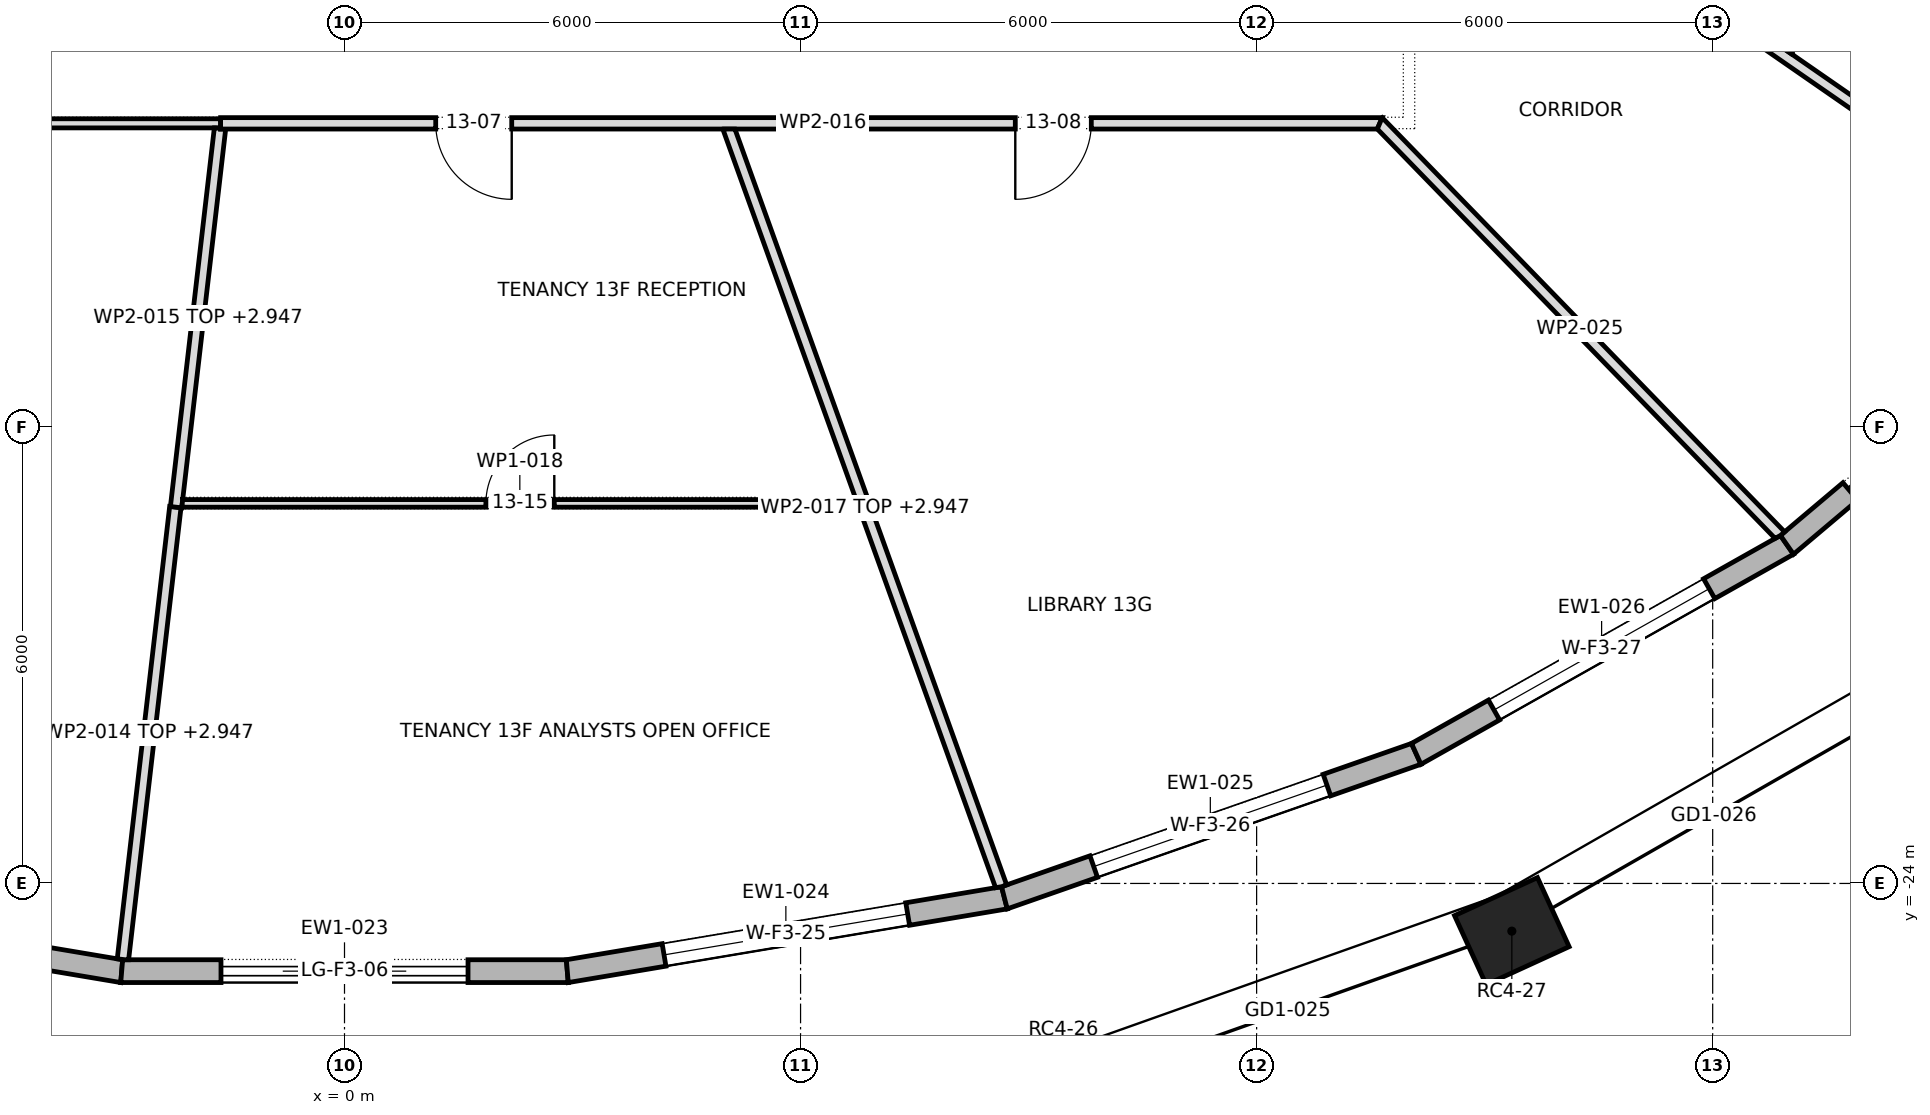
"""IFC4 building model, lengths in metres.
Left out: names, types, materials, properties, quantities, classifications, styles, units other than length and angle.
Written with IfcOpenShell. Run it as: python <this file> out.ifc"""

import sys

from ifc_helpers import new_model, si_unit, direction, frame, frame_2d, origin, origin_2d, place, context, subcontext, project, spatial, polyline, rectangle, outline, extrude, element, fill, save


model = new_model("IFC4")
c1 = context("Model", 3, precision=1e-05, world=origin(), true_north=direction((0.0, 1.0)))
c2 = subcontext(c1, "Body", "Model", "MODEL_VIEW")
j1 = project(units=[si_unit("LENGTHUNIT", "METRE"), si_unit("PLANEANGLEUNIT", "RADIAN")], contexts=[c1])
p1 = place(None, origin())
s1 = spatial("IfcSite", under=j1, at=p1, CompositionType="ELEMENT")
p2 = place(p1, origin())
s2 = spatial("IfcBuilding", under=s1, at=p2, CompositionType="ELEMENT")
p3 = place(p2, frame((0.0, 0.0, 190.9)))
s3 = spatial("IfcBuildingStorey", under=s2, at=p3, CompositionType="ELEMENT", Elevation=190.9)
p4 = place(p3, frame((15.358, -24.627, 0.0), z_axis=(0.0, 0.0, 1.0), x_axis=(0.909125641902, 0.416521988898, 0.0)))
e1 = element("IfcColumn", 1, at=p4, inside=s3, PredefinedType="COLUMN", context=c2, shape_type="SweptSolid", body=[
    extrude(rectangle(XDim=1.2, YDim=1.0, at=origin_2d()), origin(), (0.0, 0.0, 1.0), 4.0),
])
p5 = place(p3, frame((-8.682, -24.189, 0.0), z_axis=(0.0, 0.0, 1.0), x_axis=(0.986207709048, -0.165512400181, 0.0)))
e2 = element("IfcWall", 2, at=p5, inside=s3, PredefinedType="STANDARD", context=c2, shape_type="SweptSolid", body=[
    extrude(outline(polyline([(-0.013, -0.15), (5.843, -0.15), (5.818, 0.15), (0.013, 0.15), (-0.013, -0.15)])), origin(), (0.0, 0.0, 1.0), 3.7),
])
p6 = place(p5, frame((1.291, 0.0, 0.6)))
e3 = element("IfcOpeningElement", 3, at=p6, cuts=e2, PredefinedType="OPENING", context=c2, shape_type="SweptSolid", body=[
    extrude(rectangle(XDim=3.25, YDim=2.65, at=frame_2d((1.625, 1.325))), frame((0.0, 0.162, 0.0), z_axis=(0.0, -1.0, 0.0), x_axis=(1.0, 0.0, 0.0)), (0.0, 0.0, 1.0), 0.324),
])
p7 = place(p3, frame((-2.931, -25.154, 0.0), z_axis=(0.0, 0.0, 1.0), x_axis=(1.0, 0.0, 0.0)))
e4 = element("IfcWall", 4, at=p7, inside=s3, PredefinedType="STANDARD", context=c2, shape_type="SweptSolid", body=[
    extrude(outline(polyline([(-0.012, -0.15), (5.875, -0.15), (5.85, 0.15), (0.012, 0.15), (-0.012, -0.15)])), origin(), (0.0, 0.0, 1.0), 3.7),
])
p8 = place(p7, frame((1.306, 0.0, 0.0)))
e5 = element("IfcOpeningElement", 5, at=p8, cuts=e4, PredefinedType="OPENING", context=c2, shape_type="SweptSolid", body=[
    extrude(rectangle(XDim=3.25, YDim=3.25, at=frame_2d((1.625, 1.625))), frame((0.0, 0.162, 0.0), z_axis=(0.0, -1.0, 0.0), x_axis=(1.0, 0.0, 0.0)), (0.0, 0.0, 1.0), 0.324),
])
p9 = place(p3, frame((2.931, -25.154, 0.0), z_axis=(0.0, 0.0, 1.0), x_axis=(0.986207709048, 0.165512400181, 0.0)))
e6 = element("IfcWall", 6, at=p9, inside=s3, PredefinedType="STANDARD", context=c2, shape_type="SweptSolid", body=[
    extrude(outline(polyline([(-0.012, -0.15), (5.844, -0.15), (5.818, 0.15), (0.012, 0.15), (-0.012, -0.15)])), origin(), (0.0, 0.0, 1.0), 3.7),
])
p10 = place(p9, frame((1.291, 0.0, 0.6)))
e7 = element("IfcOpeningElement", 7, at=p10, cuts=e6, PredefinedType="OPENING", context=c2, shape_type="SweptSolid", body=[
    extrude(rectangle(XDim=3.25, YDim=2.65, at=frame_2d((1.625, 1.325))), frame((0.0, 0.162, 0.0), z_axis=(0.0, -1.0, 0.0), x_axis=(1.0, 0.0, 0.0)), (0.0, 0.0, 1.0), 0.324),
])
p11 = place(p3, frame((8.682, -24.189, 0.0), z_axis=(0.0, 0.0, 1.0), x_axis=(0.944020060936, 0.329888048511, 0.0)))
e8 = element("IfcWall", 8, at=p11, inside=s3, PredefinedType="STANDARD", context=c2, shape_type="SweptSolid", body=[
    extrude(outline(polyline([(-0.013, -0.15), (5.753, -0.15), (5.726, 0.15), (0.013, 0.15), (-0.013, -0.15)])), origin(), (0.0, 0.0, 1.0), 3.7),
])
p12 = place(p11, frame((1.245, 0.0, 0.6)))
e9 = element("IfcOpeningElement", 9, at=p12, cuts=e8, PredefinedType="OPENING", context=c2, shape_type="SweptSolid", body=[
    extrude(rectangle(XDim=3.25, YDim=2.65, at=frame_2d((1.625, 1.325))), frame((0.0, 0.162, 0.0), z_axis=(0.0, -1.0, 0.0), x_axis=(1.0, 0.0, 0.0)), (0.0, 0.0, 1.0), 0.324),
])
p13 = place(p3, frame((14.1, -22.295, 0.0), z_axis=(0.0, 0.0, 1.0), x_axis=(0.871083701819, 0.491134588912, 0.0)))
e10 = element("IfcWall", 10, at=p13, inside=s3, PredefinedType="STANDARD", context=c2, shape_type="SweptSolid", body=[
    extrude(outline(polyline([(-0.013, -0.15), (5.614, -0.15), (5.585, 0.15), (0.013, 0.15), (-0.013, -0.15)])), origin(), (0.0, 0.0, 1.0), 3.7),
])
p14 = place(p13, frame((1.175, 0.0, 0.6)))
e11 = element("IfcOpeningElement", 11, at=p14, cuts=e10, PredefinedType="OPENING", context=c2, shape_type="SweptSolid", body=[
    extrude(rectangle(XDim=3.25, YDim=2.65, at=frame_2d((1.625, 1.325))), frame((0.0, 0.162, 0.0), z_axis=(0.0, -1.0, 0.0), x_axis=(1.0, 0.0, 0.0)), (0.0, 0.0, 1.0), 0.324),
])
p15 = place(p3, frame((18.977, -19.545, 0.0), z_axis=(0.0, 0.0, 1.0), x_axis=(0.764330261608, 0.644824977176, 0.0)))
e12 = element("IfcWall", 12, at=p15, inside=s3, PredefinedType="STANDARD", context=c2, shape_type="SweptSolid", body=[
    extrude(outline(polyline([(-0.014, -0.15), (5.445, -0.15), (5.415, 0.15), (0.014, 0.15), (-0.014, -0.15)])), origin(), (0.0, 0.0, 1.0), 3.7),
])
p16 = place(p15, frame((1.09, 0.0, 0.0)))
e13 = element("IfcOpeningElement", 13, at=p16, cuts=e12, PredefinedType="OPENING", context=c2, shape_type="SweptSolid", body=[
    extrude(rectangle(XDim=3.25, YDim=3.25, at=frame_2d((1.625, 1.625))), frame((0.0, 0.162, 0.0), z_axis=(0.0, -1.0, 0.0), x_axis=(1.0, 0.0, 0.0)), (0.0, 0.0, 1.0), 0.324),
])
p17 = place(p3, frame((-13.646, -14.0, 0.0), z_axis=(0.0, 0.0, 1.0), x_axis=(1.0, 0.0, 0.0)))
e14 = element("IfcWall", 14, at=p17, inside=s3, PredefinedType="PARTITIONING", context=c2, shape_type="SweptSolid", body=[
    extrude(outline(polyline([(12.016, 0.06), (10.299, 0.06), (8.583, 0.06), (6.866, 0.06), (5.15, 0.06), (3.433, 0.06), (1.717, 0.06), (0.0, 0.06), (0.051, -0.06), (2.045, -0.06), (4.039, -0.06), (6.033, -0.06), (8.027, -0.06), (10.021, -0.06), (12.016, -0.06), (12.016, 0.06)])), origin(), (0.0, 0.0, 1.0), 3.7),
])
p18 = place(p17, frame((5.521, 0.0, 0.0)))
e15 = element("IfcOpeningElement", 15, at=p18, cuts=e14, PredefinedType="OPENING", context=c2, shape_type="SweptSolid", body=[
    extrude(rectangle(XDim=1.0, YDim=2.1, at=frame_2d((0.5, 1.05))), frame((0.0, 0.072, 0.0), z_axis=(0.0, -1.0, 0.0), x_axis=(1.0, 0.0, 0.0)), (0.0, 0.0, 1.0), 0.144),
])
p19 = place(p3, frame((-2.915, -25.0, 0.0), z_axis=(0.0, 0.0, 1.0), x_axis=(0.115112831027, 0.993352422926, 0.0)))
e16 = element("IfcWall", 16, at=p19, inside=s3, PredefinedType="PARTITIONING", context=c2, shape_type="SweptSolid", body=[
    extrude(outline(polyline([(0.0, 0.075), (0.0, -0.031), (0.005, -0.075), (2.0, -0.075), (3.996, -0.075), (5.991, -0.075), (5.991, 0.075), (3.994, 0.075), (1.997, 0.075), (0.0, 0.075)])), origin(), (0.0, 0.0, 1.0), 2.947),
])
p20 = place(p3, frame((-2.216, -19.05, 0.0), z_axis=(0.0, 0.0, 1.0), x_axis=(0.11524289965, 0.993337341531, 0.0)))
e17 = element("IfcWall", 17, at=p20, inside=s3, PredefinedType="PARTITIONING", context=c2, shape_type="SweptSolid", body=[
    extrude(outline(polyline([(0.0, -0.075), (0.099, -0.075), (0.109, -0.074), (0.109, -0.075), (1.745, -0.075), (3.381, -0.075), (5.017, -0.075), (5.017, -0.073), (5.009, -0.009), (5.017, -0.008), (5.017, 0.058), (5.015, 0.075), (3.343, 0.075), (1.672, 0.075), (0.0, 0.075), (0.0, -0.065), (0.0, -0.065), (0.0, -0.075)])), origin(), (0.0, 0.0, 1.0), 2.947),
])
p21 = place(p3, frame((-1.63, -14.0, 0.0), z_axis=(0.0, 0.0, 1.0), x_axis=(1.0, 0.0, 0.0)))
e18 = element("IfcWall", 18, at=p21, inside=s3, PredefinedType="PARTITIONING", context=c2, shape_type="SweptSolid", body=[
    extrude(outline(polyline([(0.0, -0.075), (1.902, -0.075), (3.804, -0.075), (5.707, -0.075), (7.609, -0.075), (9.511, -0.075), (11.414, -0.075), (13.316, -0.075), (15.218, -0.075), (15.281, 0.075), (15.281, 0.075), (13.371, 0.075), (11.461, 0.075), (9.551, 0.075), (7.641, 0.075), (5.73, 0.075), (3.82, 0.075), (1.91, 0.075), (0.0, 0.075), (0.0, -0.075)])), origin(), (0.0, 0.0, 1.0), 3.7),
])
p22 = place(p21, frame((2.83, 0.0, 0.0)))
e19 = element("IfcOpeningElement", 19, at=p22, cuts=e18, PredefinedType="OPENING", context=c2, shape_type="SweptSolid", body=[
    extrude(rectangle(XDim=1.0, YDim=2.1, at=frame_2d((0.5, 1.05))), frame((0.0, 0.087, 0.0), z_axis=(0.0, -1.0, 0.0), x_axis=(1.0, 0.0, 0.0)), (0.0, 0.0, 1.0), 0.174),
])
p23 = place(p21, frame((10.455, 0.0, 0.0)))
e20 = element("IfcOpeningElement", 20, at=p23, cuts=e18, PredefinedType="OPENING", context=c2, shape_type="SweptSolid", body=[
    extrude(rectangle(XDim=1.0, YDim=2.1, at=frame_2d((0.5, 1.05))), frame((0.0, 0.087, 0.0), z_axis=(0.0, -1.0, 0.0), x_axis=(1.0, 0.0, 0.0)), (0.0, 0.0, 1.0), 0.174),
])
p24 = place(p3, frame((5.048, -14.05, 0.0), z_axis=(0.0, 0.0, 1.0), x_axis=(0.338318960249, -0.941031498482, 0.0)))
e21 = element("IfcWall", 21, at=p24, inside=s3, PredefinedType="PARTITIONING", context=c2, shape_type="SweptSolid", body=[
    extrude(outline(polyline([(0.0, -0.075), (1.727, -0.075), (3.454, -0.075), (5.18, -0.075), (5.181, -0.073), (5.188, -0.075), (6.994, -0.075), (8.8, -0.075), (10.606, -0.075), (10.621, 0.004), (10.621, 0.032), (10.621, 0.075), (8.86, 0.075), (7.098, 0.075), (5.337, 0.075), (3.576, 0.075), (1.815, 0.075), (0.054, 0.075), (0.0, -0.074), (0.0, -0.075)])), origin(), (0.0, 0.0, 1.0), 2.947),
])
p25 = place(p3, frame((6.765, -19.0, 0.0), z_axis=(0.0, 0.0, 1.0), x_axis=(-1.0, 0.0, 0.0)))
e22 = element("IfcWall", 22, at=p25, inside=s3, PredefinedType="PARTITIONING", context=c2, shape_type="SweptSolid", body=[
    extrude(outline(polyline([(0.035, -0.05), (1.807, -0.05), (3.579, -0.05), (5.351, -0.05), (7.122, -0.05), (8.894, -0.05), (8.905, 0.046), (8.905, 0.05), (7.124, 0.05), (5.343, 0.05), (3.562, 0.05), (1.781, 0.05), (0.0, 0.05), (0.0, 0.049), (0.035, -0.05)])), origin(), (0.0, 0.0, 1.0), 3.7),
])
p26 = place(p25, frame((4.006, 0.0, 0.0)))
e23 = element("IfcOpeningElement", 23, at=p26, cuts=e22, PredefinedType="OPENING", context=c2, shape_type="SweptSolid", body=[
    extrude(rectangle(XDim=0.9, YDim=2.1, at=frame_2d((0.45, 1.05))), frame((0.0, 0.062, 0.0), z_axis=(0.0, -1.0, 0.0), x_axis=(1.0, 0.0, 0.0)), (0.0, 0.0, 1.0), 0.124),
])
p27 = place(p3, frame((13.968, -9.667, 0.0), z_axis=(0.0, 0.0, 1.0), x_axis=(0.822097241007, -0.569347105313, 0.0)))
e24 = element("IfcWall", 24, at=p27, inside=s3, PredefinedType="PARTITIONING", context=c2, shape_type="SweptSolid", body=[
    extrude(outline(polyline([(0.0, -0.075), (1.832, -0.075), (3.664, -0.075), (5.496, -0.075), (7.328, -0.075), (9.16, -0.075), (10.992, -0.075), (11.012, -0.002), (11.017, 0.07), (11.017, 0.075), (9.349, 0.075), (7.682, 0.075), (6.014, 0.075), (6.01, 0.072), (6.009, 0.075), (4.032, 0.075), (2.055, 0.075), (0.079, 0.075), (0.039, -0.0), (0.0, -0.075)])), origin(), (0.0, 0.0, 1.0), 2.947),
])
p28 = place(p3, frame((18.893, -19.427, 0.0), z_axis=(0.0, 0.0, 1.0), x_axis=(-0.696864554069, 0.717202756048, 0.0)))
e25 = element("IfcWall", 25, at=p28, inside=s3, PredefinedType="PARTITIONING", context=c2, shape_type="SweptSolid", body=[
    extrude(outline(polyline([(0.0, -0.075), (1.9, -0.075), (3.799, -0.075), (5.699, -0.075), (7.599, -0.075), (7.567, 0.0), (7.535, 0.075), (5.658, 0.075), (3.78, 0.075), (1.903, 0.075), (0.025, 0.075), (0.005, -0.003), (0.0, -0.073), (0.0, -0.075)])), origin(), (0.0, 0.0, 1.0), 3.7),
])
p29 = place(p3, frame((19.0, -4.926, 0.0), z_axis=(0.0, 0.0, 1.0), x_axis=(0.0, -1.0, 0.0)))
e26 = element("IfcWall", 26, at=p29, inside=s3, PredefinedType="PARTITIONING", context=c2, shape_type="SweptSolid", body=[
    extrude(outline(polyline([(0.0, -0.05), (1.62, -0.05), (3.24, -0.05), (4.86, -0.05), (6.481, -0.05), (8.101, -0.05), (8.169, 0.049), (8.169, 0.05), (6.541, 0.05), (4.912, 0.05), (3.283, 0.05), (1.654, 0.05), (0.025, 0.05), (0.0, -0.049), (0.0, -0.05)])), origin(), (0.0, 0.0, 1.0), 3.7),
])
p30 = place(p29, frame((3.629, 0.0, 0.0)))
e27 = element("IfcOpeningElement", 27, at=p30, cuts=e26, PredefinedType="OPENING", context=c2, shape_type="SweptSolid", body=[
    extrude(rectangle(XDim=0.9, YDim=2.1, at=frame_2d((0.45, 1.05))), frame((0.0, 0.062, 0.0), z_axis=(0.0, -1.0, 0.0), x_axis=(1.0, 0.0, 0.0)), (0.0, 0.0, 1.0), 0.124),
])
p31 = place(p8, origin())
e28 = element("IfcDoor", 28, at=p31, inside=s3, OperationType="DOUBLE_DOOR_SLIDING", PredefinedType="DOOR", context=c2, shape_type="SweptSolid", body=[
    extrude(rectangle(XDim=3.25, YDim=3.25, at=frame_2d((1.625, 1.625))), frame((0.0, 0.025, 0.0), z_axis=(0.0, -1.0, 0.0), x_axis=(1.0, 0.0, 0.0)), (0.0, 0.0, 1.0), 0.05),
])
fill(e5, e28)
p32 = place(p10, origin())
e29 = element("IfcWindow", 29, at=p32, inside=s3, PartitioningType="TRIPLE_PANEL_VERTICAL", PredefinedType="WINDOW", context=c2, shape_type="SweptSolid", body=[
    extrude(rectangle(XDim=3.25, YDim=2.65, at=frame_2d((1.625, 1.325))), frame((0.0, 0.03, 0.0), z_axis=(0.0, -1.0, 0.0), x_axis=(1.0, 0.0, 0.0)), (0.0, 0.0, 1.0), 0.06),
])
fill(e7, e29)
p33 = place(p12, origin())
e30 = element("IfcWindow", 30, at=p33, inside=s3, PartitioningType="TRIPLE_PANEL_VERTICAL", PredefinedType="WINDOW", context=c2, shape_type="SweptSolid", body=[
    extrude(rectangle(XDim=3.25, YDim=2.65, at=frame_2d((1.625, 1.325))), frame((0.0, 0.03, 0.0), z_axis=(0.0, -1.0, 0.0), x_axis=(1.0, 0.0, 0.0)), (0.0, 0.0, 1.0), 0.06),
])
fill(e9, e30)
p34 = place(p14, origin())
e31 = element("IfcWindow", 31, at=p34, inside=s3, PartitioningType="TRIPLE_PANEL_VERTICAL", PredefinedType="WINDOW", context=c2, shape_type="SweptSolid", body=[
    extrude(rectangle(XDim=3.25, YDim=2.65, at=frame_2d((1.625, 1.325))), frame((0.0, 0.03, 0.0), z_axis=(0.0, -1.0, 0.0), x_axis=(1.0, 0.0, 0.0)), (0.0, 0.0, 1.0), 0.06),
])
fill(e11, e31)
p35 = place(p16, origin())
e32 = element("IfcDoor", 32, at=p35, inside=s3, OperationType="DOUBLE_DOOR_SLIDING", PredefinedType="DOOR", context=c2, shape_type="SweptSolid", body=[
    extrude(rectangle(XDim=3.25, YDim=3.25, at=frame_2d((1.625, 1.625))), frame((0.0, 0.025, 0.0), z_axis=(0.0, -1.0, 0.0), x_axis=(1.0, 0.0, 0.0)), (0.0, 0.0, 1.0), 0.05),
])
fill(e13, e32)
p36 = place(p22, frame((1.0, 0.0, 0.0), z_axis=(0.0, 0.0, 1.0), x_axis=(-1.0, 0.0, 0.0)))
e33 = element("IfcDoor", 33, at=p36, inside=s3, OperationType="SINGLE_SWING_RIGHT", PredefinedType="DOOR", context=c2, shape_type="SweptSolid", body=[
    extrude(rectangle(XDim=1.0, YDim=2.1, at=frame_2d((0.5, 1.05))), frame((0.0, 0.025, 0.0), z_axis=(0.0, -1.0, 0.0), x_axis=(1.0, 0.0, 0.0)), (0.0, 0.0, 1.0), 0.05),
])
fill(e19, e33)
p37 = place(p23, frame((1.0, 0.0, 0.0), z_axis=(0.0, 0.0, 1.0), x_axis=(-1.0, 0.0, 0.0)))
e34 = element("IfcDoor", 34, at=p37, inside=s3, OperationType="SINGLE_SWING_LEFT", PredefinedType="DOOR", context=c2, shape_type="SweptSolid", body=[
    extrude(rectangle(XDim=1.0, YDim=2.1, at=frame_2d((0.5, 1.05))), frame((0.0, 0.025, 0.0), z_axis=(0.0, -1.0, 0.0), x_axis=(1.0, 0.0, 0.0)), (0.0, 0.0, 1.0), 0.05),
])
fill(e20, e34)
p38 = place(p26, frame((0.9, 0.0, 0.0), z_axis=(0.0, 0.0, 1.0), x_axis=(-1.0, 0.0, 0.0)))
e35 = element("IfcDoor", 35, at=p38, inside=s3, OperationType="SINGLE_SWING_LEFT", PredefinedType="DOOR", context=c2, shape_type="SweptSolid", body=[
    extrude(rectangle(XDim=0.9, YDim=2.1, at=frame_2d((0.45, 1.05))), frame((0.0, 0.025, 0.0), z_axis=(0.0, -1.0, 0.0), x_axis=(1.0, 0.0, 0.0)), (0.0, 0.0, 1.0), 0.05),
])
fill(e23, e35)
save(model, sys.argv[1])
